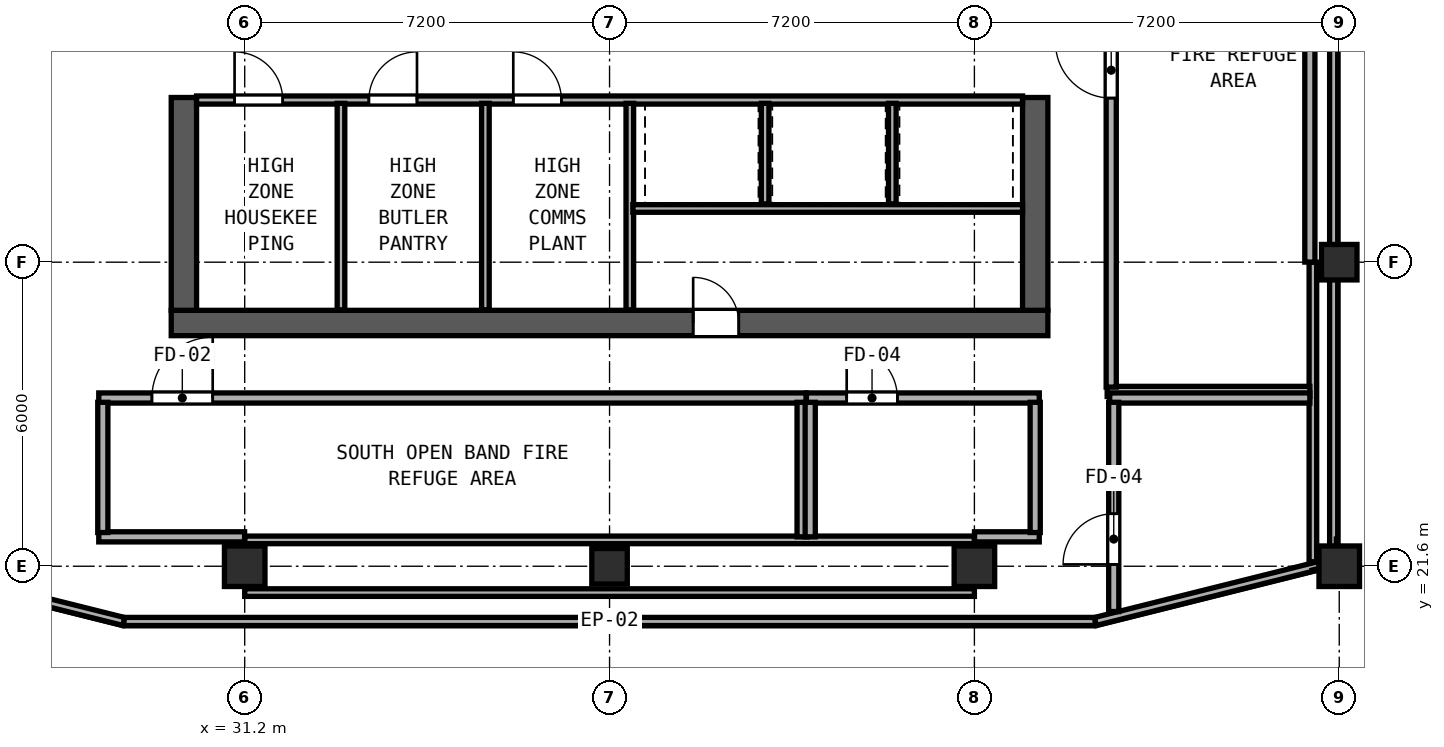
"""IFC4 building model, lengths in metres.
Left out: names, types, materials, properties, quantities, classifications, styles, units other than length and angle.
Written with IfcOpenShell. Run it as: python <this file> out.ifc"""

import sys

from ifc_helpers import new_model, si_unit, direction, frame, frame_2d, origin, origin_2d, place, context, subcontext, project, spatial, rectangle, hollow_rectangle, extrude, element, fill, save


model = new_model("IFC4")
c1 = context("Model", 3, precision=1e-05, world=origin(), true_north=direction((0.0, 1.0)))
c2 = subcontext(c1, "Body", "Model", "MODEL_VIEW")
j1 = project(units=[si_unit("LENGTHUNIT", "METRE"), si_unit("PLANEANGLEUNIT", "RADIAN")], contexts=[c1])
p1 = place(None, origin())
s1 = spatial("IfcSite", under=j1, at=p1, CompositionType="ELEMENT")
p2 = place(p1, origin())
s2 = spatial("IfcBuilding", under=s1, at=p2, CompositionType="ELEMENT")
p3 = place(p2, frame((0.0, 0.0, 277.55)))
s3 = spatial("IfcBuildingStorey", under=s2, at=p3, CompositionType="ELEMENT", Elevation=277.55)
p4 = place(p3, frame((29.75, 26.4, 0.0), z_axis=(0.0, 0.0, 1.0), x_axis=(1.0, 0.0, 0.0)))
e1 = element("IfcWall", 1, at=p4, inside=s3, PredefinedType="SHEAR", context=c2, shape_type="SweptSolid", body=[
    extrude(rectangle(XDim=17.3, YDim=0.5, at=frame_2d((8.65, 0.0))), origin(), (0.0, 0.0, 1.0), 4.4),
])
p5 = place(p4, frame((11.2, 0.0, 0.0), z_axis=(0.0, 0.0, 1.0), x_axis=(-1.0, 0.0, 0.0)))
e2 = element("IfcOpeningElement", 2, at=p5, cuts=e1, PredefinedType="OPENING", context=c2, shape_type="SweptSolid", body=[
    extrude(rectangle(XDim=0.9, YDim=2.1, at=frame_2d((0.45, 1.05))), frame((0.0, 0.26, 0.0), z_axis=(0.0, -1.0, 0.0), x_axis=(1.0, 0.0, 0.0)), (0.0, 0.0, 1.0), 0.52),
])
for number, where, z_axis, x_axis in (
    (3, (30.0, 26.65, 0.0), (0.0, 0.0, 1.0), (0.0, 1.0, 0.0)),
    (4, (46.8, 26.65, 0.0), (0.0, 0.0, 1.0), (0.0, 1.0, 0.0)),
):
    element("IfcWall", number, at=place(p3, frame(where, z_axis=z_axis, x_axis=x_axis)), inside=s3, PredefinedType="SHEAR", context=c2, shape_type="SweptSolid", body=[
        extrude(rectangle(XDim=4.2, YDim=0.5, at=frame_2d((2.1, 0.0))), origin(), (0.0, 0.0, 1.0), 4.4),
    ])
for number, where, z_axis, x_axis in (
    (5, (52.8, 21.6, 0.0), (0.0, 0.0, 1.0), (1.0, 0.0, 0.0)),
    (6, (31.2, 21.6, 0.0), (0.0, 0.0, 1.0), (1.0, 0.0, 0.0)),
    (7, (45.6, 21.6, 0.0), (0.0, 0.0, 1.0), (1.0, 0.0, 0.0)),
):
    element("IfcColumn", number, at=place(p3, frame(where, z_axis=z_axis, x_axis=x_axis)), inside=s3, PredefinedType="COLUMN", context=c2, shape_type="SweptSolid", body=[
        extrude(hollow_rectangle(XDim=0.8, YDim=0.8, WallThickness=0.03, at=origin_2d()), origin(), (0.0, 0.0, 1.0), 4.65),
    ])
for number, where, z_axis, x_axis in (
    (8, (52.8, 27.6, 0.0), (0.0, 0.0, 1.0), (1.0, 0.0, 0.0)),
    (9, (38.4, 21.6, 0.0), (0.0, 0.0, 1.0), (1.0, 0.0, 0.0)),
):
    element("IfcColumn", number, at=place(p3, frame(where, z_axis=z_axis, x_axis=x_axis)), inside=s3, PredefinedType="COLUMN", context=c2, shape_type="SweptSolid", body=[
        extrude(hollow_rectangle(XDim=0.7, YDim=0.7, WallThickness=0.026, at=origin_2d()), origin(), (0.0, 0.0, 1.0), 4.65),
    ])
p6 = place(p3, frame((28.813, 20.51, 0.0), z_axis=(0.0, 0.0, 1.0), x_axis=(1.0, 0.0, 0.0)))
e10 = element("IfcWall", 10, at=p6, inside=s3, PredefinedType="PARAPET", context=c2, shape_type="SweptSolid", body=[
    extrude(rectangle(XDim=19.173, YDim=0.16, at=frame_2d((9.586, 0.0))), origin(), (0.0, 0.0, 1.0), 1.15),
])
p7 = place(p3, frame((47.987, 20.51, 0.0), z_axis=(0.0, 0.0, 1.0), x_axis=(0.970136197572, 0.242560833937, 0.0)))
e11 = element("IfcWall", 11, at=p7, inside=s3, PredefinedType="PARAPET", context=c2, shape_type="SweptSolid", body=[
    extrude(rectangle(XDim=4.557, YDim=0.16, at=frame_2d((2.279, 0.0))), origin(), (0.0, 0.0, 1.0), 1.15),
])
for number, where, z_axis, x_axis in (
    (12, (52.69, 21.992, 0.0), (0.0, 0.0, 1.0), (0.0, 1.0, 0.0)),
    (13, (52.69, 27.942, 0.0), (0.0, 0.0, 1.0), (0.0, 1.0, 0.0)),
):
    element("IfcWall", number, at=place(p3, frame(where, z_axis=z_axis, x_axis=x_axis)), inside=s3, PredefinedType="PARAPET", context=c2, shape_type="SweptSolid", body=[
        extrude(rectangle(XDim=5.266, YDim=0.16, at=frame_2d((2.633, 0.0))), origin(), (0.0, 0.0, 1.0), 1.15),
    ])
p8 = place(p3, frame((24.392, 21.615, 0.0), z_axis=(0.0, 0.0, 1.0), x_axis=(0.970136197572, -0.242560833937, 0.0)))
e14 = element("IfcWall", 14, at=p8, inside=s3, PredefinedType="PARAPET", context=c2, shape_type="SweptSolid", body=[
    extrude(rectangle(XDim=4.557, YDim=0.16, at=frame_2d((2.279, 0.0))), origin(), (0.0, 0.0, 1.0), 1.15),
])
p9 = place(p3, frame((30.25, 30.8, 0.0), z_axis=(0.0, 0.0, 1.0), x_axis=(1.0, 0.0, 0.0)))
e15 = element("IfcWall", 15, at=p9, inside=s3, PredefinedType="SOLIDWALL", context=c2, shape_type="SweptSolid", body=[
    extrude(rectangle(XDim=16.3, YDim=0.16, at=frame_2d((8.15, 0.0))), origin(), (0.0, 0.0, 1.0), 4.4),
])
p10 = place(p9, frame((0.75, 0.0, 0.0)))
e16 = element("IfcOpeningElement", 16, at=p10, cuts=e15, PredefinedType="OPENING", context=c2, shape_type="SweptSolid", body=[
    extrude(rectangle(XDim=0.95, YDim=2.12, at=frame_2d((0.475, 1.06))), frame((0.0, 0.09, 0.0), z_axis=(0.0, -1.0, 0.0), x_axis=(1.0, 0.0, 0.0)), (0.0, 0.0, 1.0), 0.18),
])
p11 = place(p9, frame((3.4, 0.0, 0.0)))
e17 = element("IfcOpeningElement", 17, at=p11, cuts=e15, PredefinedType="OPENING", context=c2, shape_type="SweptSolid", body=[
    extrude(rectangle(XDim=0.95, YDim=2.12, at=frame_2d((0.475, 1.06))), frame((0.0, 0.09, 0.0), z_axis=(0.0, -1.0, 0.0), x_axis=(1.0, 0.0, 0.0)), (0.0, 0.0, 1.0), 0.18),
])
p12 = place(p9, frame((6.25, 0.0, 0.0)))
e18 = element("IfcOpeningElement", 18, at=p12, cuts=e15, PredefinedType="OPENING", context=c2, shape_type="SweptSolid", body=[
    extrude(rectangle(XDim=0.95, YDim=2.12, at=frame_2d((0.475, 1.06))), frame((0.0, 0.09, 0.0), z_axis=(0.0, -1.0, 0.0), x_axis=(1.0, 0.0, 0.0)), (0.0, 0.0, 1.0), 0.18),
])
p13 = place(p3, frame((38.8, 26.66, 0.0), z_axis=(0.0, 0.0, 1.0), x_axis=(0.0, 1.0, 0.0)))
e19 = element("IfcWall", 19, at=p13, inside=s3, PredefinedType="SOLIDWALL", context=c2, shape_type="SweptSolid", body=[
    extrude(rectangle(XDim=4.075, YDim=0.15, at=frame_2d((2.038, 0.0))), origin(), (0.0, 0.0, 1.0), 4.4),
])
for number, where, z_axis, x_axis in (
    (20, (33.1, 26.66, 0.0), (0.0, 0.0, 1.0), (0.0, 1.0, 0.0)),
    (21, (35.95, 26.66, 0.0), (0.0, 0.0, 1.0), (0.0, 1.0, 0.0)),
):
    element("IfcWall", number, at=place(p3, frame(where, z_axis=z_axis, x_axis=x_axis)), inside=s3, PredefinedType="PARTITIONING", context=c2, shape_type="SweptSolid", body=[
        extrude(rectangle(XDim=4.075, YDim=0.15, at=frame_2d((2.038, 0.0))), origin(), (0.0, 0.0, 1.0), 4.4),
    ])
p14 = place(p3, frame((38.86, 28.66, 0.0), z_axis=(0.0, 0.0, 1.0), x_axis=(1.0, 0.0, 0.0)))
e22 = element("IfcWall", 22, at=p14, inside=s3, PredefinedType="PARTITIONING", context=c2, shape_type="SweptSolid", body=[
    extrude(rectangle(XDim=7.69, YDim=0.15, at=frame_2d((3.845, 0.0))), origin(), (0.0, 0.0, 1.0), 4.4),
])
for number, where, z_axis, x_axis in (
    (23, (41.47, 28.75, 0.0), (0.0, 0.0, 1.0), (0.0, 1.0, 0.0)),
    (24, (43.98, 28.75, 0.0), (0.0, 0.0, 1.0), (0.0, 1.0, 0.0)),
):
    element("IfcWall", number, at=place(p3, frame(where, z_axis=z_axis, x_axis=x_axis)), inside=s3, PredefinedType="SOLIDWALL", context=c2, shape_type="SweptSolid", body=[
        extrude(rectangle(XDim=1.985, YDim=0.15, at=frame_2d((0.993, 0.0))), origin(), (0.0, 0.0, 1.0), 4.4),
    ])
p15 = place(p3, frame((52.28, 21.688, 0.0), z_axis=(0.0, 0.0, 1.0), x_axis=(0.0, 1.0, 0.0)))
e25 = element("IfcWall", 25, at=p15, inside=s3, PredefinedType="PARTITIONING", context=c2, shape_type="SweptSolid", body=[
    extrude(rectangle(XDim=5.912, YDim=0.15, at=frame_2d((2.956, 0.0))), origin(), (0.0, 0.0, 1.0), 4.4),
])
for number, where, z_axis, x_axis in (
    (26, (31.2, 21.08, 0.0), (0.0, 0.0, 1.0), (1.0, 0.0, 0.0)),
    (27, (31.2, 22.12, 0.0), (0.0, 0.0, 1.0), (1.0, 0.0, 0.0)),
):
    element("IfcWall", number, at=place(p3, frame(where, z_axis=z_axis, x_axis=x_axis)), inside=s3, PredefinedType="PARTITIONING", context=c2, shape_type="SweptSolid", body=[
        extrude(rectangle(XDim=14.4, YDim=0.15, at=frame_2d((7.2, 0.0))), origin(), (0.0, 0.0, 1.0), 4.4),
    ])
p16 = place(p3, frame((48.22, 25.05, 0.0), z_axis=(0.0, 0.0, 1.0), x_axis=(1.0, 0.0, 0.0)))
e28 = element("IfcWall", 28, at=p16, inside=s3, PredefinedType="SOLIDWALL", context=c2, shape_type="SweptSolid", body=[
    extrude(rectangle(XDim=4.0, YDim=0.2, at=frame_2d((2.0, 0.0))), origin(), (0.0, 0.0, 1.0), 4.4),
])
p17 = place(p3, frame((48.3, 25.135, 0.0), z_axis=(0.0, 0.0, 1.0), x_axis=(0.0, 1.0, 0.0)))
e29 = element("IfcWall", 29, at=p17, inside=s3, PredefinedType="SOLIDWALL", context=c2, shape_type="SweptSolid", body=[
    extrude(rectangle(XDim=13.58, YDim=0.2, at=frame_2d((6.79, 0.0))), origin(), (0.0, 0.0, 1.0), 4.4),
])
p18 = place(p17, frame((5.704, 0.0, 0.0)))
e30 = element("IfcOpeningElement", 30, at=p18, cuts=e29, PredefinedType="OPENING", context=c2, shape_type="SweptSolid", body=[
    extrude(rectangle(XDim=1.1, YDim=2.15, at=frame_2d((0.55, 1.075))), frame((0.0, 0.11, 0.0), z_axis=(0.0, -1.0, 0.0), x_axis=(1.0, 0.0, 0.0)), (0.0, 0.0, 1.0), 0.22),
])
p19 = place(p3, frame((52.22, 27.602, 0.0), z_axis=(0.0, 0.0, 1.0), x_axis=(0.0, 1.0, 0.0)))
e31 = element("IfcWall", 31, at=p19, inside=s3, PredefinedType="SOLIDWALL", context=c2, shape_type="SweptSolid", body=[
    extrude(rectangle(XDim=5.996, YDim=0.2, at=frame_2d((2.998, 0.0))), origin(), (0.0, 0.0, 1.0), 4.4),
])
p20 = place(p3, frame((28.32, 24.92, 0.0), z_axis=(0.0, 0.0, 1.0), x_axis=(1.0, 0.0, 0.0)))
e32 = element("IfcWall", 32, at=p20, inside=s3, PredefinedType="SOLIDWALL", context=c2, shape_type="SweptSolid", body=[
    extrude(rectangle(XDim=13.96, YDim=0.2, at=frame_2d((6.98, 0.0))), origin(), (0.0, 0.0, 1.0), 4.4),
])
p21 = place(p20, frame((2.249, 0.0, 0.0), z_axis=(0.0, 0.0, 1.0), x_axis=(-1.0, 0.0, 0.0)))
e33 = element("IfcOpeningElement", 33, at=p21, cuts=e32, PredefinedType="OPENING", context=c2, shape_type="SweptSolid", body=[
    extrude(rectangle(XDim=1.2, YDim=2.15, at=frame_2d((0.6, 1.075))), frame((0.0, 0.11, 0.0), z_axis=(0.0, -1.0, 0.0), x_axis=(1.0, 0.0, 0.0)), (0.0, 0.0, 1.0), 0.22),
])
p22 = place(p3, frame((28.32, 22.18, 0.0), z_axis=(0.0, 0.0, 1.0), x_axis=(1.0, 0.0, 0.0)))
e34 = element("IfcWall", 34, at=p22, inside=s3, PredefinedType="SOLIDWALL", context=c2, shape_type="SweptSolid", body=[
    extrude(rectangle(XDim=2.878, YDim=0.2, at=frame_2d((1.439, 0.0))), origin(), (0.0, 0.0, 1.0), 4.4),
])
p23 = place(p3, frame((28.4, 22.265, 0.0), z_axis=(0.0, 0.0, 1.0), x_axis=(0.0, 1.0, 0.0)))
e35 = element("IfcWall", 35, at=p23, inside=s3, PredefinedType="SOLIDWALL", context=c2, shape_type="SweptSolid", body=[
    extrude(rectangle(XDim=2.57, YDim=0.2, at=frame_2d((1.285, 0.0))), origin(), (0.0, 0.0, 1.0), 4.4),
])
p24 = place(p3, frame((42.2, 22.18, 0.0), z_axis=(0.0, 0.0, 1.0), x_axis=(0.0, 1.0, 0.0)))
e36 = element("IfcWall", 36, at=p24, inside=s3, PredefinedType="SOLIDWALL", context=c2, shape_type="SweptSolid", body=[
    extrude(rectangle(XDim=2.655, YDim=0.2, at=frame_2d((1.328, 0.0))), origin(), (0.0, 0.0, 1.0), 4.4),
])
p25 = place(p3, frame((42.285, 24.92, 0.0), z_axis=(0.0, 0.0, 1.0), x_axis=(1.0, 0.0, 0.0)))
e37 = element("IfcWall", 37, at=p25, inside=s3, PredefinedType="SOLIDWALL", context=c2, shape_type="SweptSolid", body=[
    extrude(rectangle(XDim=4.595, YDim=0.2, at=frame_2d((2.297, 0.0))), origin(), (0.0, 0.0, 1.0), 4.4),
])
p26 = place(p25, frame((1.795, 0.0, 0.0), z_axis=(0.0, 0.0, 1.0), x_axis=(-1.0, 0.0, 0.0)))
e38 = element("IfcOpeningElement", 38, at=p26, cuts=e37, PredefinedType="OPENING", context=c2, shape_type="SweptSolid", body=[
    extrude(rectangle(XDim=1.0, YDim=2.1, at=frame_2d((0.5, 1.05))), frame((0.0, 0.11, 0.0), z_axis=(0.0, -1.0, 0.0), x_axis=(1.0, 0.0, 0.0)), (0.0, 0.0, 1.0), 0.22),
])
p27 = place(p3, frame((45.602, 22.18, 0.0), z_axis=(0.0, 0.0, 1.0), x_axis=(1.0, 0.0, 0.0)))
e39 = element("IfcWall", 39, at=p27, inside=s3, PredefinedType="SOLIDWALL", context=c2, shape_type="SweptSolid", body=[
    extrude(rectangle(XDim=1.278, YDim=0.2, at=frame_2d((0.639, 0.0))), origin(), (0.0, 0.0, 1.0), 4.4),
])
p28 = place(p3, frame((42.36, 22.18, 0.0), z_axis=(0.0, 0.0, 1.0), x_axis=(0.0, 1.0, 0.0)))
e40 = element("IfcWall", 40, at=p28, inside=s3, PredefinedType="SOLIDWALL", context=c2, shape_type="SweptSolid", body=[
    extrude(rectangle(XDim=2.655, YDim=0.2, at=frame_2d((1.328, 0.0))), origin(), (0.0, 0.0, 1.0), 4.4),
])
p29 = place(p3, frame((46.8, 22.265, 0.0), z_axis=(0.0, 0.0, 1.0), x_axis=(0.0, 1.0, 0.0)))
e41 = element("IfcWall", 41, at=p29, inside=s3, PredefinedType="SOLIDWALL", context=c2, shape_type="SweptSolid", body=[
    extrude(rectangle(XDim=2.57, YDim=0.2, at=frame_2d((1.285, 0.0))), origin(), (0.0, 0.0, 1.0), 4.4),
])
p30 = place(p3, frame((48.27, 24.92, 0.0), z_axis=(0.0, 0.0, 1.0), x_axis=(1.0, 0.0, 0.0)))
e42 = element("IfcWall", 42, at=p30, inside=s3, PredefinedType="SOLIDWALL", context=c2, shape_type="SweptSolid", body=[
    extrude(rectangle(XDim=3.95, YDim=0.2, at=frame_2d((1.975, 0.0))), origin(), (0.0, 0.0, 1.0), 4.4),
])
p31 = place(p3, frame((48.35, 20.706, 0.0), z_axis=(0.0, 0.0, 1.0), x_axis=(0.0, 1.0, 0.0)))
e43 = element("IfcWall", 43, at=p31, inside=s3, PredefinedType="SOLIDWALL", context=c2, shape_type="SweptSolid", body=[
    extrude(rectangle(XDim=4.129, YDim=0.2, at=frame_2d((2.064, 0.0))), origin(), (0.0, 0.0, 1.0), 4.4),
])
p32 = place(p31, frame((0.93, 0.0, 0.0)))
e44 = element("IfcOpeningElement", 44, at=p32, cuts=e43, PredefinedType="OPENING", context=c2, shape_type="SweptSolid", body=[
    extrude(rectangle(XDim=1.0, YDim=2.1, at=frame_2d((0.5, 1.05))), frame((0.0, 0.11, 0.0), z_axis=(0.0, -1.0, 0.0), x_axis=(1.0, 0.0, 0.0)), (0.0, 0.0, 1.0), 0.22),
])
p33 = place(p10, origin())
e45 = element("IfcDoor", 45, at=p33, inside=s3, OperationType="SINGLE_SWING_LEFT", PredefinedType="DOOR", context=c2, shape_type="SweptSolid", body=[
    extrude(rectangle(XDim=0.95, YDim=2.12, at=frame_2d((0.475, 1.06))), frame((0.0, 0.025, 0.0), z_axis=(0.0, -1.0, 0.0), x_axis=(1.0, 0.0, 0.0)), (0.0, 0.0, 1.0), 0.05),
])
fill(e16, e45)
p34 = place(p11, origin())
e46 = element("IfcDoor", 46, at=p34, inside=s3, OperationType="SINGLE_SWING_RIGHT", PredefinedType="DOOR", context=c2, shape_type="SweptSolid", body=[
    extrude(rectangle(XDim=0.95, YDim=2.12, at=frame_2d((0.475, 1.06))), frame((0.0, 0.025, 0.0), z_axis=(0.0, -1.0, 0.0), x_axis=(1.0, 0.0, 0.0)), (0.0, 0.0, 1.0), 0.05),
])
fill(e17, e46)
p35 = place(p12, origin())
e47 = element("IfcDoor", 47, at=p35, inside=s3, OperationType="SINGLE_SWING_LEFT", PredefinedType="DOOR", context=c2, shape_type="SweptSolid", body=[
    extrude(rectangle(XDim=0.95, YDim=2.12, at=frame_2d((0.475, 1.06))), frame((0.0, 0.025, 0.0), z_axis=(0.0, -1.0, 0.0), x_axis=(1.0, 0.0, 0.0)), (0.0, 0.0, 1.0), 0.05),
])
fill(e18, e47)
p36 = place(p5, origin())
e48 = element("IfcDoor", 48, at=p36, inside=s3, OperationType="SINGLE_SWING_RIGHT", PredefinedType="DOOR", context=c2, shape_type="SweptSolid", body=[
    extrude(rectangle(XDim=0.9, YDim=2.1, at=frame_2d((0.45, 1.05))), frame((0.0, -0.195, 0.0), z_axis=(0.0, -1.0, 0.0), x_axis=(1.0, 0.0, 0.0)), (0.0, 0.0, 1.0), 0.05),
])
fill(e2, e48)
p37 = place(p18, origin())
e49 = element("IfcDoor", 49, at=p37, inside=s3, OperationType="SINGLE_SWING_RIGHT", PredefinedType="DOOR", context=c2, shape_type="SweptSolid", body=[
    extrude(rectangle(XDim=1.1, YDim=2.15, at=frame_2d((0.55, 1.075))), frame((0.0, 0.025, 0.0), z_axis=(0.0, -1.0, 0.0), x_axis=(1.0, 0.0, 0.0)), (0.0, 0.0, 1.0), 0.05),
])
fill(e30, e49)
p38 = place(p21, origin())
e50 = element("IfcDoor", 50, at=p38, inside=s3, OperationType="SINGLE_SWING_LEFT", PredefinedType="DOOR", context=c2, shape_type="SweptSolid", body=[
    extrude(rectangle(XDim=1.2, YDim=2.15, at=frame_2d((0.6, 1.075))), frame((0.0, 0.025, 0.0), z_axis=(0.0, -1.0, 0.0), x_axis=(1.0, 0.0, 0.0)), (0.0, 0.0, 1.0), 0.05),
])
fill(e33, e50)
p39 = place(p26, origin())
e51 = element("IfcDoor", 51, at=p39, inside=s3, OperationType="SINGLE_SWING_RIGHT", PredefinedType="DOOR", context=c2, shape_type="SweptSolid", body=[
    extrude(rectangle(XDim=1.0, YDim=2.1, at=frame_2d((0.5, 1.05))), frame((0.0, 0.025, 0.0), z_axis=(0.0, -1.0, 0.0), x_axis=(1.0, 0.0, 0.0)), (0.0, 0.0, 1.0), 0.05),
])
fill(e38, e51)
p40 = place(p32, origin())
e52 = element("IfcDoor", 52, at=p40, inside=s3, OperationType="SINGLE_SWING_LEFT", PredefinedType="DOOR", context=c2, shape_type="SweptSolid", body=[
    extrude(rectangle(XDim=1.0, YDim=2.1, at=frame_2d((0.5, 1.05))), frame((0.0, 0.025, 0.0), z_axis=(0.0, -1.0, 0.0), x_axis=(1.0, 0.0, 0.0)), (0.0, 0.0, 1.0), 0.05),
])
fill(e44, e52)
save(model, sys.argv[1])
